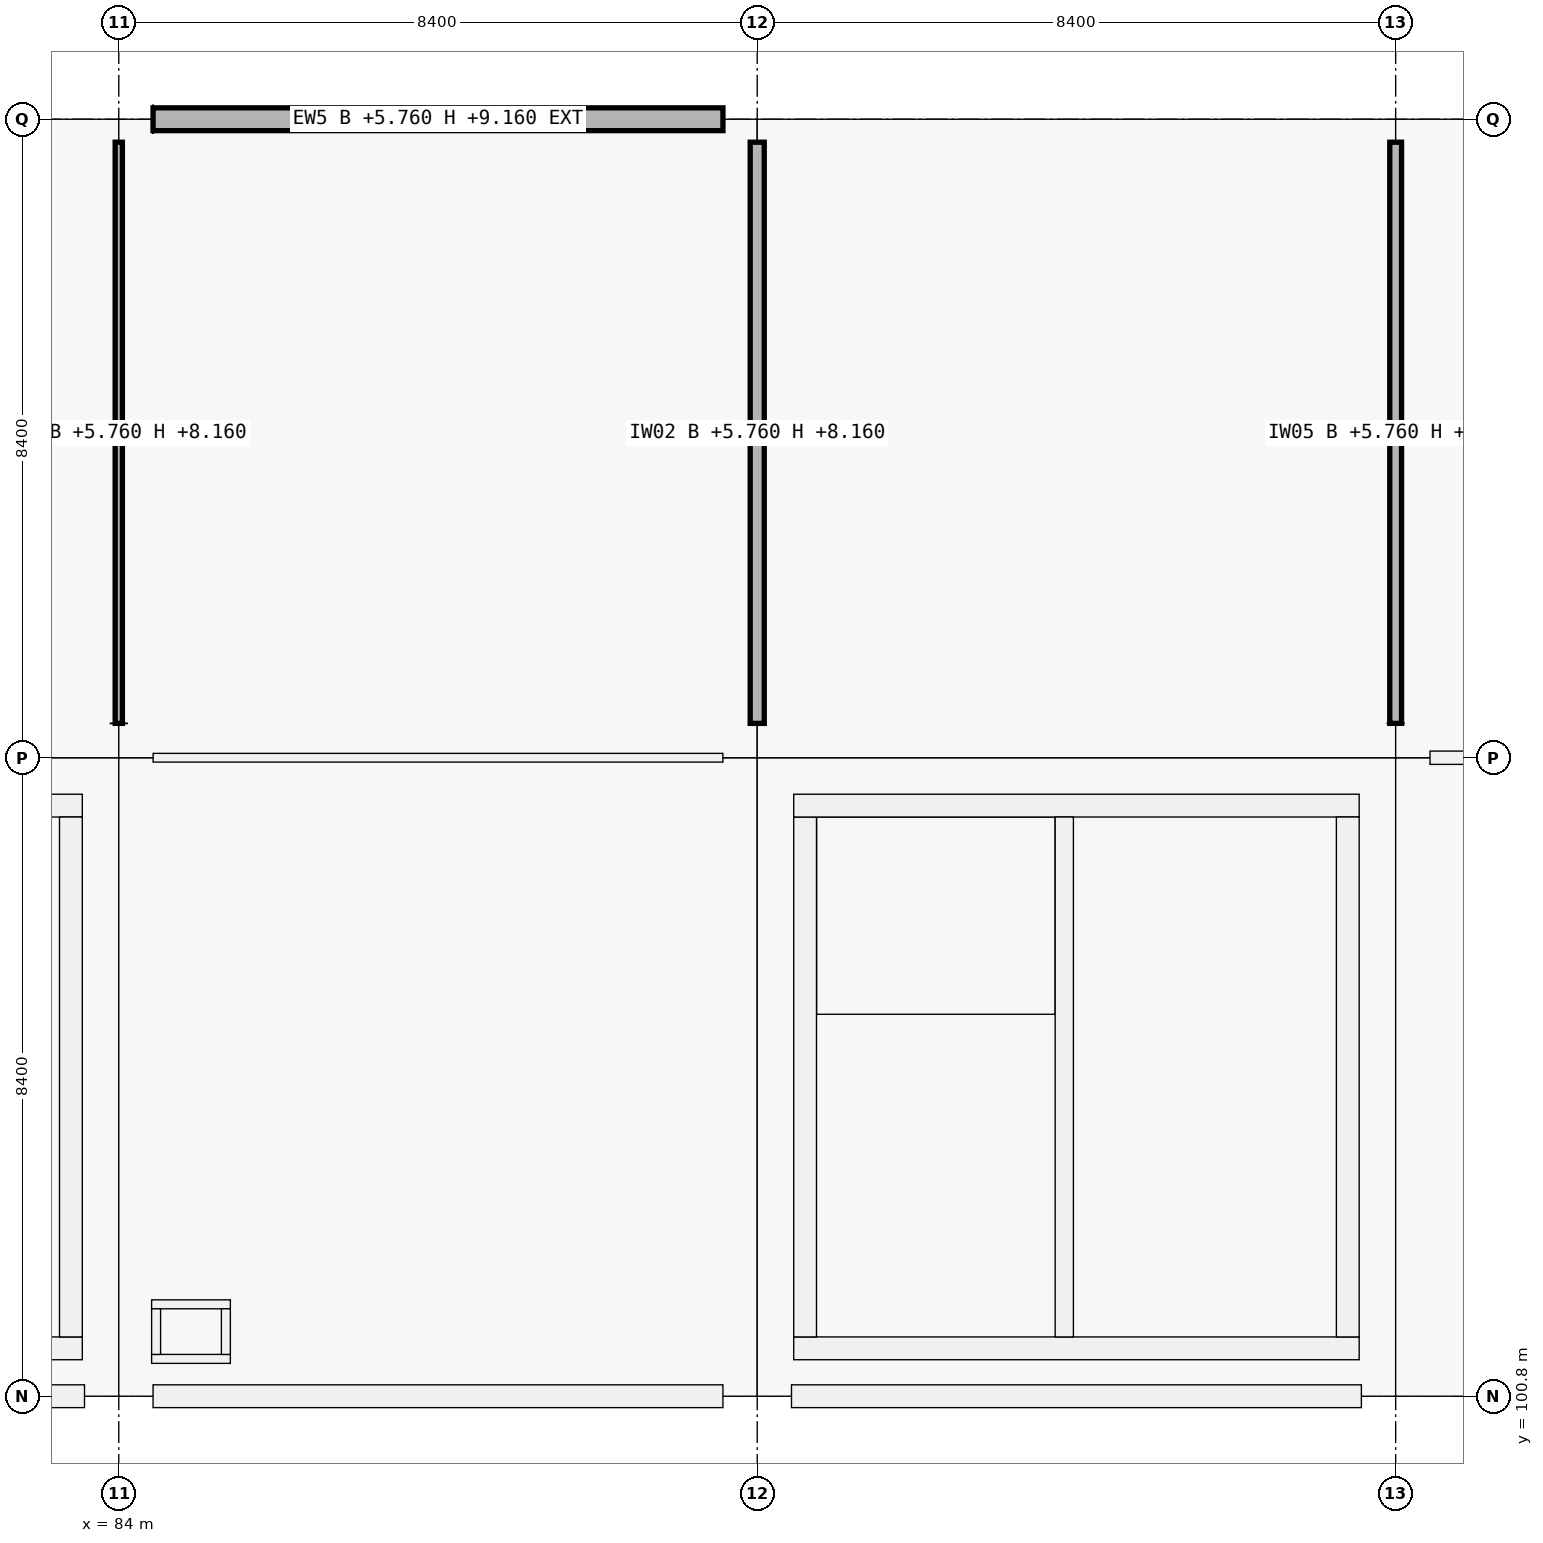
"""IFC4 building model, lengths in metres.
Left out: names, types, materials, properties, quantities, classifications, styles, units other than length and angle.
Written with IfcOpenShell. Run it as: python <this file> out.ifc"""

import sys

from ifc_helpers import new_model, si_unit, direction, frame, frame_2d, origin, origin_2d, place, context, subcontext, project, spatial, rectangle, extrude, element, fill, save


model = new_model("IFC4")
c1 = context("Model", 3, precision=1e-05, world=origin(), true_north=direction((0.0, 1.0)))
c2 = subcontext(c1, "Body", "Model", "MODEL_VIEW")
j1 = project(units=[si_unit("LENGTHUNIT", "METRE"), si_unit("PLANEANGLEUNIT", "RADIAN")], contexts=[c1])
p1 = place(None, origin())
s1 = spatial("IfcSite", under=j1, at=p1, CompositionType="ELEMENT")
p2 = place(p1, origin())
s2 = spatial("IfcBuilding", under=s1, at=p2, CompositionType="ELEMENT")
p3 = place(p2, frame((0.0, 0.0, 5.76)))
s3 = spatial("IfcBuildingStorey", under=s2, at=p3, CompositionType="ELEMENT", Elevation=5.76)
for number, where, z_axis, x_axis in (
    (1, (84.0, 100.8, 0.0), (0.0, 0.0, 1.0), (1.0, 0.0, 0.0)),
    (2, (84.0, 109.2, 0.0), (0.0, 0.0, 1.0), (1.0, 0.0, 0.0)),
):
    element("IfcColumn", number, at=place(p3, frame(where, z_axis=z_axis, x_axis=x_axis)), inside=s3, PredefinedType="COLUMN", context=c2, shape_type="SweptSolid", body=[
        extrude(rectangle(XDim=0.9, YDim=0.9, at=origin_2d()), origin(), (0.0, 0.0, 1.0), 4.5),
    ])
p4 = place(p3, frame((84.0, 117.6, 0.0), z_axis=(0.0, 0.0, 1.0), x_axis=(1.0, 0.0, 0.0)))
e3 = element("IfcColumn", 3, at=p4, inside=s3, PredefinedType="COLUMN", context=c2, shape_type="SweptSolid", body=[
    extrude(rectangle(XDim=0.9, YDim=0.6, at=origin_2d()), origin(), (0.0, 0.0, 1.0), 4.5),
])
for number, where, z_axis, x_axis in (
    (4, (92.4, 100.8, 0.0), (0.0, 0.0, 1.0), (1.0, 0.0, 0.0)),
    (5, (92.4, 109.2, 0.0), (0.0, 0.0, 1.0), (1.0, 0.0, 0.0)),
):
    element("IfcColumn", number, at=place(p3, frame(where, z_axis=z_axis, x_axis=x_axis)), inside=s3, PredefinedType="COLUMN", context=c2, shape_type="SweptSolid", body=[
        extrude(rectangle(XDim=0.9, YDim=0.9, at=origin_2d()), origin(), (0.0, 0.0, 1.0), 4.5),
    ])
p5 = place(p3, frame((92.4, 117.6, 0.0), z_axis=(0.0, 0.0, 1.0), x_axis=(1.0, 0.0, 0.0)))
e6 = element("IfcColumn", 6, at=p5, inside=s3, PredefinedType="COLUMN", context=c2, shape_type="SweptSolid", body=[
    extrude(rectangle(XDim=0.9, YDim=0.6, at=origin_2d()), origin(), (0.0, 0.0, 1.0), 4.5),
])
for number, where, z_axis, x_axis in (
    (7, (100.8, 100.8, 0.0), (0.0, 0.0, 1.0), (1.0, 0.0, 0.0)),
    (8, (100.8, 109.2, 0.0), (0.0, 0.0, 1.0), (1.0, 0.0, 0.0)),
):
    element("IfcColumn", number, at=place(p3, frame(where, z_axis=z_axis, x_axis=x_axis)), inside=s3, PredefinedType="COLUMN", context=c2, shape_type="SweptSolid", body=[
        extrude(rectangle(XDim=0.9, YDim=0.9, at=origin_2d()), origin(), (0.0, 0.0, 1.0), 4.5),
    ])
p6 = place(p3, frame((100.8, 117.6, 0.0), z_axis=(0.0, 0.0, 1.0), x_axis=(1.0, 0.0, 0.0)))
e9 = element("IfcColumn", 9, at=p6, inside=s3, PredefinedType="COLUMN", context=c2, shape_type="SweptSolid", body=[
    extrude(rectangle(XDim=0.9, YDim=0.6, at=origin_2d()), origin(), (0.0, 0.0, 1.0), 4.5),
])
p7 = place(p3, frame((83.549, 100.8, 0.0), z_axis=(0.0, 0.0, 1.0), x_axis=(-1.0, 0.0, 0.0)))
e10 = element("IfcWall", 10, at=p7, inside=s3, PredefinedType="SOLIDWALL", context=c2, shape_type="SweptSolid", body=[
    extrude(rectangle(XDim=7.498, YDim=0.3, at=frame_2d((3.749, 0.0))), origin(), (0.0, 0.0, 1.0), 3.4),
])
p8 = place(p3, frame((91.949, 100.8, 0.0), z_axis=(0.0, 0.0, 1.0), x_axis=(-1.0, 0.0, 0.0)))
e11 = element("IfcWall", 11, at=p8, inside=s3, PredefinedType="SOLIDWALL", context=c2, shape_type="SweptSolid", body=[
    extrude(rectangle(XDim=7.498, YDim=0.3, at=frame_2d((3.749, 0.0))), origin(), (0.0, 0.0, 1.0), 3.4),
])
p9 = place(p8, frame((2.249, 0.0, 0.9)))
e12 = element("IfcOpeningElement", 12, at=p9, cuts=e11, PredefinedType="OPENING", context=c2, shape_type="SweptSolid", body=[
    extrude(rectangle(XDim=3.0, YDim=1.2, at=frame_2d((1.5, 0.6))), frame((0.0, 0.15, 0.0), z_axis=(0.0, -1.0, 0.0), x_axis=(1.0, 0.0, 0.0)), (0.0, 0.0, 1.0), 0.3),
])
p10 = place(p3, frame((84.451, 117.6, 0.0), z_axis=(0.0, 0.0, 1.0), x_axis=(1.0, 0.0, 0.0)))
e13 = element("IfcWall", 13, at=p10, inside=s3, PredefinedType="SOLIDWALL", context=c2, shape_type="SweptSolid", body=[
    extrude(rectangle(XDim=7.498, YDim=0.3, at=frame_2d((3.749, 0.0))), origin(), (0.0, 0.0, 1.0), 3.4),
])
p11 = place(p10, frame((2.399, 0.0, 0.9)))
e14 = element("IfcOpeningElement", 14, at=p11, cuts=e13, PredefinedType="OPENING", context=c2, shape_type="SweptSolid", body=[
    extrude(rectangle(XDim=2.7, YDim=1.2, at=frame_2d((1.35, 0.6))), frame((0.0, 0.15, 0.0), z_axis=(0.0, -1.0, 0.0), x_axis=(1.0, 0.0, 0.0)), (0.0, 0.0, 1.0), 0.3),
])
p12 = place(p3, frame((100.349, 100.8, 0.0), z_axis=(0.0, 0.0, 1.0), x_axis=(-1.0, 0.0, 0.0)))
e15 = element("IfcWall", 15, at=p12, inside=s3, PredefinedType="SOLIDWALL", context=c2, shape_type="SweptSolid", body=[
    extrude(rectangle(XDim=7.498, YDim=0.3, at=frame_2d((3.749, 0.0))), origin(), (0.0, 0.0, 1.0), 3.4),
])
for number, where, z_axis, x_axis in (
    (16, (83.52, 101.43, 0.0), (0.0, 0.0, 1.0), (-1.0, 0.0, 0.0)),
    (17, (76.08, 108.57, 0.0), (0.0, 0.0, 1.0), (1.0, 0.0, 0.0)),
):
    element("IfcWall", number, at=place(p3, frame(where, z_axis=z_axis, x_axis=x_axis)), inside=s3, PredefinedType="SHEAR", context=c2, shape_type="SweptSolid", body=[
        extrude(rectangle(XDim=7.44, YDim=0.3, at=frame_2d((3.72, 0.0))), origin(), (0.0, 0.0, 1.0), 4.5),
    ])
p13 = place(p3, frame((83.37, 108.42, 0.0), z_axis=(0.0, 0.0, 1.0), x_axis=(0.0, -1.0, 0.0)))
e18 = element("IfcWall", 18, at=p13, inside=s3, PredefinedType="SHEAR", context=c2, shape_type="SweptSolid", body=[
    extrude(rectangle(XDim=6.84, YDim=0.3, at=frame_2d((3.42, 0.0))), origin(), (0.0, 0.0, 1.0), 4.5),
])
p14 = place(p13, frame((3.97, 0.0, 0.0)))
e19 = element("IfcOpeningElement", 19, at=p14, cuts=e18, PredefinedType="OPENING", context=c2, shape_type="SweptSolid", body=[
    extrude(rectangle(XDim=1.5, YDim=2.15, at=frame_2d((0.75, 1.075))), frame((0.0, 0.15, 0.0), z_axis=(0.0, -1.0, 0.0), x_axis=(1.0, 0.0, 0.0)), (0.0, 0.0, 1.0), 0.3),
])
p15 = place(p3, frame((100.32, 101.43, 0.0), z_axis=(0.0, 0.0, 1.0), x_axis=(-1.0, 0.0, 0.0)))
e20 = element("IfcWall", 20, at=p15, inside=s3, PredefinedType="SHEAR", context=c2, shape_type="SweptSolid", body=[
    extrude(rectangle(XDim=7.44, YDim=0.3, at=frame_2d((3.72, 0.0))), origin(), (0.0, 0.0, 1.0), 4.5),
])
p16 = place(p3, frame((93.03, 101.58, 0.0), z_axis=(0.0, 0.0, 1.0), x_axis=(0.0, 1.0, 0.0)))
e21 = element("IfcWall", 21, at=p16, inside=s3, PredefinedType="SHEAR", context=c2, shape_type="SweptSolid", body=[
    extrude(rectangle(XDim=6.84, YDim=0.3, at=frame_2d((3.42, 0.0))), origin(), (0.0, 0.0, 1.0), 4.5),
])
p17 = place(p3, frame((92.88, 108.57, 0.0), z_axis=(0.0, 0.0, 1.0), x_axis=(1.0, 0.0, 0.0)))
e22 = element("IfcWall", 22, at=p17, inside=s3, PredefinedType="SHEAR", context=c2, shape_type="SweptSolid", body=[
    extrude(rectangle(XDim=7.44, YDim=0.3, at=frame_2d((3.72, 0.0))), origin(), (0.0, 0.0, 1.0), 4.5),
])
p18 = place(p3, frame((100.17, 108.42, 0.0), z_axis=(0.0, 0.0, 1.0), x_axis=(0.0, -1.0, 0.0)))
e23 = element("IfcWall", 23, at=p18, inside=s3, PredefinedType="SHEAR", context=c2, shape_type="SweptSolid", body=[
    extrude(rectangle(XDim=6.84, YDim=0.3, at=frame_2d((3.42, 0.0))), origin(), (0.0, 0.0, 1.0), 4.5),
])
p19 = place(p18, frame((3.97, 0.0, 0.0)))
e24 = element("IfcOpeningElement", 24, at=p19, cuts=e23, PredefinedType="OPENING", context=c2, shape_type="SweptSolid", body=[
    extrude(rectangle(XDim=1.5, YDim=2.15, at=frame_2d((0.75, 1.075))), frame((0.0, 0.15, 0.0), z_axis=(0.0, -1.0, 0.0), x_axis=(1.0, 0.0, 0.0)), (0.0, 0.0, 1.0), 0.3),
])
p20 = place(p3, frame((96.44, 101.58, 0.0), z_axis=(0.0, 0.0, 1.0), x_axis=(0.0, 1.0, 0.0)))
e25 = element("IfcWall", 25, at=p20, inside=s3, PredefinedType="SHEAR", context=c2, shape_type="SweptSolid", body=[
    extrude(rectangle(XDim=6.84, YDim=0.24, at=frame_2d((3.42, 0.0))), origin(), (0.0, 0.0, 1.0), 4.5),
])
p21 = place(p20, frame((0.12, 0.0, 0.0)))
e26 = element("IfcOpeningElement", 26, at=p21, cuts=e25, PredefinedType="OPENING", context=c2, shape_type="SweptSolid", body=[
    extrude(rectangle(XDim=1.0, YDim=2.15, at=frame_2d((0.5, 1.075))), frame((0.0, 0.12, 0.0), z_axis=(0.0, -1.0, 0.0), x_axis=(1.0, 0.0, 0.0)), (0.0, 0.0, 1.0), 0.24),
])
for number, where, z_axis, x_axis in (
    (27, (84.432, 101.291, 0.0), (0.0, 0.0, 1.0), (1.0, 0.0, 0.0)),
    (28, (84.432, 102.009, 0.0), (0.0, 0.0, 1.0), (1.0, 0.0, 0.0)),
):
    element("IfcWall", number, at=place(p3, frame(where, z_axis=z_axis, x_axis=x_axis)), inside=s3, PredefinedType="PARTITIONING", context=c2, shape_type="SweptSolid", body=[
        extrude(rectangle(XDim=1.036, YDim=0.118, at=frame_2d((0.518, 0.0))), origin(), (0.0, 0.0, 1.0), 3.48),
    ])
for number, where, z_axis, x_axis in (
    (29, (84.491, 101.35, 0.0), (0.0, 0.0, 1.0), (0.0, 1.0, 0.0)),
    (30, (85.409, 101.35, 0.0), (0.0, 0.0, 1.0), (0.0, 1.0, 0.0)),
):
    element("IfcWall", number, at=place(p3, frame(where, z_axis=z_axis, x_axis=x_axis)), inside=s3, PredefinedType="PARTITIONING", context=c2, shape_type="SweptSolid", body=[
        extrude(rectangle(XDim=0.6, YDim=0.118, at=frame_2d((0.3, 0.0))), origin(), (0.0, 0.0, 1.0), 3.48),
    ])
p22 = place(p3, frame((84.452, 109.2, 0.0), z_axis=(0.0, 0.0, 1.0), x_axis=(1.0, 0.0, 0.0)))
e31 = element("IfcWall", 31, at=p22, inside=s3, PredefinedType="PARTITIONING", context=c2, shape_type="SweptSolid", body=[
    extrude(rectangle(XDim=7.496, YDim=0.115, at=frame_2d((3.748, 0.0))), origin(), (0.0, 0.0, 1.0), 2.4),
])
p23 = place(p22, frame((3.218, 0.0, 0.0)))
e32 = element("IfcOpeningElement", 32, at=p23, cuts=e31, PredefinedType="OPENING", context=c2, shape_type="SweptSolid", body=[
    extrude(rectangle(XDim=1.06, YDim=2.22, at=frame_2d((0.53, 1.11))), frame((0.0, 0.058, 0.0), z_axis=(0.0, -1.0, 0.0), x_axis=(1.0, 0.0, 0.0)), (0.0, 0.0, 1.0), 0.115),
])
p24 = place(p3, frame((101.252, 109.2, 0.0), z_axis=(0.0, 0.0, 1.0), x_axis=(1.0, 0.0, 0.0)))
e33 = element("IfcWall", 33, at=p24, inside=s3, PredefinedType="PARTITIONING", context=c2, shape_type="SweptSolid", body=[
    extrude(rectangle(XDim=7.496, YDim=0.175, at=frame_2d((3.748, 0.0))), origin(), (0.0, 0.0, 1.0), 2.4),
])
p25 = place(p24, frame((3.238, 0.0, 0.0)))
e34 = element("IfcOpeningElement", 34, at=p25, cuts=e33, PredefinedType="OPENING", context=c2, shape_type="SweptSolid", body=[
    extrude(rectangle(XDim=1.02, YDim=2.2, at=frame_2d((0.51, 1.1))), frame((0.0, 0.087, 0.0), z_axis=(0.0, -1.0, 0.0), x_axis=(1.0, 0.0, 0.0)), (0.0, 0.0, 1.0), 0.175),
])
p26 = place(p3, frame((84.0, 109.652, 0.0), z_axis=(0.0, 0.0, 1.0), x_axis=(0.0, 1.0, 0.0)))
e35 = element("IfcWall", 35, at=p26, inside=s3, PredefinedType="PARTITIONING", context=c2, shape_type="SweptSolid", body=[
    extrude(rectangle(XDim=7.646, YDim=0.095, at=frame_2d((3.823, 0.0))), origin(), (0.0, 0.0, 1.0), 2.4),
])
p27 = place(p26, frame((3.353, 0.0, 0.0)))
e36 = element("IfcOpeningElement", 36, at=p27, cuts=e35, PredefinedType="OPENING", context=c2, shape_type="SweptSolid", body=[
    extrude(rectangle(XDim=0.94, YDim=2.15, at=frame_2d((0.47, 1.075))), frame((0.0, 0.047, 0.0), z_axis=(0.0, -1.0, 0.0), x_axis=(1.0, 0.0, 0.0)), (0.0, 0.0, 1.0), 0.095),
])
p28 = place(p3, frame((92.4, 109.652, 0.0), z_axis=(0.0, 0.0, 1.0), x_axis=(0.0, 1.0, 0.0)))
e37 = element("IfcWall", 37, at=p28, inside=s3, PredefinedType="PARTITIONING", context=c2, shape_type="SweptSolid", body=[
    extrude(rectangle(XDim=7.646, YDim=0.185, at=frame_2d((3.823, 0.0))), origin(), (0.0, 0.0, 1.0), 2.4),
])
p29 = place(p28, frame((3.363, 0.0, 0.0)))
e38 = element("IfcOpeningElement", 38, at=p29, cuts=e37, PredefinedType="OPENING", context=c2, shape_type="SweptSolid", body=[
    extrude(rectangle(XDim=0.92, YDim=2.15, at=frame_2d((0.46, 1.075))), frame((0.0, 0.093, 0.0), z_axis=(0.0, -1.0, 0.0), x_axis=(1.0, 0.0, 0.0)), (0.0, 0.0, 1.0), 0.185),
])
p30 = place(p3, frame((100.8, 109.652, 0.0), z_axis=(0.0, 0.0, 1.0), x_axis=(0.0, 1.0, 0.0)))
e39 = element("IfcWall", 39, at=p30, inside=s3, PredefinedType="PARTITIONING", context=c2, shape_type="SweptSolid", body=[
    extrude(rectangle(XDim=7.646, YDim=0.155, at=frame_2d((3.823, 0.0))), origin(), (0.0, 0.0, 1.0), 2.4),
])
p31 = place(p30, frame((3.343, 0.0, 0.0)))
e40 = element("IfcOpeningElement", 40, at=p31, cuts=e39, PredefinedType="OPENING", context=c2, shape_type="SweptSolid", body=[
    extrude(rectangle(XDim=0.96, YDim=2.18, at=frame_2d((0.48, 1.09))), frame((0.0, 0.078, 0.0), z_axis=(0.0, -1.0, 0.0), x_axis=(1.0, 0.0, 0.0)), (0.0, 0.0, 1.0), 0.155),
])
p32 = place(p9, origin())
e41 = element("IfcWindow", 41, at=p32, inside=s3, PartitioningType="SINGLE_PANEL", PredefinedType="WINDOW", context=c2, shape_type="SweptSolid", body=[
    extrude(rectangle(XDim=3.0, YDim=1.2, at=frame_2d((1.5, 0.6))), frame((0.0, 0.03, 0.0), z_axis=(0.0, -1.0, 0.0), x_axis=(1.0, 0.0, 0.0)), (0.0, 0.0, 1.0), 0.06),
])
fill(e12, e41)
p33 = place(p11, origin())
e42 = element("IfcWindow", 42, at=p33, inside=s3, PartitioningType="SINGLE_PANEL", PredefinedType="WINDOW", context=c2, shape_type="SweptSolid", body=[
    extrude(rectangle(XDim=2.7, YDim=1.2, at=frame_2d((1.35, 0.6))), frame((0.0, 0.03, 0.0), z_axis=(0.0, -1.0, 0.0), x_axis=(1.0, 0.0, 0.0)), (0.0, 0.0, 1.0), 0.06),
])
fill(e14, e42)
p34 = place(p14, origin())
e43 = element("IfcDoor", 43, at=p34, inside=s3, OperationType="DOUBLE_DOOR_SINGLE_SWING", PredefinedType="DOOR", context=c2, shape_type="SweptSolid", body=[
    extrude(rectangle(XDim=1.5, YDim=2.15, at=frame_2d((0.75, 1.075))), frame((0.0, 0.025, 0.0), z_axis=(0.0, -1.0, 0.0), x_axis=(1.0, 0.0, 0.0)), (0.0, 0.0, 1.0), 0.05),
])
fill(e19, e43)
p35 = place(p21, origin())
e44 = element("IfcDoor", 44, at=p35, inside=s3, OperationType="SINGLE_SWING_LEFT", PredefinedType="DOOR", context=c2, shape_type="SweptSolid", body=[
    extrude(rectangle(XDim=1.0, YDim=2.15, at=frame_2d((0.5, 1.075))), frame((0.0, 0.025, 0.0), z_axis=(0.0, -1.0, 0.0), x_axis=(1.0, 0.0, 0.0)), (0.0, 0.0, 1.0), 0.05),
])
fill(e26, e44)
p36 = place(p19, origin())
e45 = element("IfcDoor", 45, at=p36, inside=s3, OperationType="DOUBLE_DOOR_SINGLE_SWING", PredefinedType="DOOR", context=c2, shape_type="SweptSolid", body=[
    extrude(rectangle(XDim=1.5, YDim=2.15, at=frame_2d((0.75, 1.075))), frame((0.0, 0.025, 0.0), z_axis=(0.0, -1.0, 0.0), x_axis=(1.0, 0.0, 0.0)), (0.0, 0.0, 1.0), 0.05),
])
fill(e24, e45)
p37 = place(p23, origin())
e46 = element("IfcDoor", 46, at=p37, inside=s3, OperationType="SINGLE_SWING_RIGHT", PredefinedType="DOOR", context=c2, shape_type="SweptSolid", body=[
    extrude(rectangle(XDim=1.06, YDim=2.22, at=frame_2d((0.53, 1.11))), frame((0.0, 0.025, 0.0), z_axis=(0.0, -1.0, 0.0), x_axis=(1.0, 0.0, 0.0)), (0.0, 0.0, 1.0), 0.05),
])
fill(e32, e46)
p38 = place(p27, origin())
e47 = element("IfcDoor", 47, at=p38, inside=s3, OperationType="SINGLE_SWING_RIGHT", PredefinedType="DOOR", context=c2, shape_type="SweptSolid", body=[
    extrude(rectangle(XDim=0.94, YDim=2.15, at=frame_2d((0.47, 1.075))), frame((0.0, 0.025, 0.0), z_axis=(0.0, -1.0, 0.0), x_axis=(1.0, 0.0, 0.0)), (0.0, 0.0, 1.0), 0.05),
])
fill(e36, e47)
p39 = place(p29, origin())
e48 = element("IfcDoor", 48, at=p39, inside=s3, OperationType="SINGLE_SWING_LEFT", PredefinedType="DOOR", context=c2, shape_type="SweptSolid", body=[
    extrude(rectangle(XDim=0.92, YDim=2.15, at=frame_2d((0.46, 1.075))), frame((0.0, 0.025, 0.0), z_axis=(0.0, -1.0, 0.0), x_axis=(1.0, 0.0, 0.0)), (0.0, 0.0, 1.0), 0.05),
])
fill(e38, e48)
p40 = place(p31, origin())
e49 = element("IfcDoor", 49, at=p40, inside=s3, OperationType="SINGLE_SWING_RIGHT", PredefinedType="DOOR", context=c2, shape_type="SweptSolid", body=[
    extrude(rectangle(XDim=0.96, YDim=2.18, at=frame_2d((0.48, 1.09))), frame((0.0, 0.025, 0.0), z_axis=(0.0, -1.0, 0.0), x_axis=(1.0, 0.0, 0.0)), (0.0, 0.0, 1.0), 0.05),
])
fill(e40, e49)
save(model, sys.argv[1])
